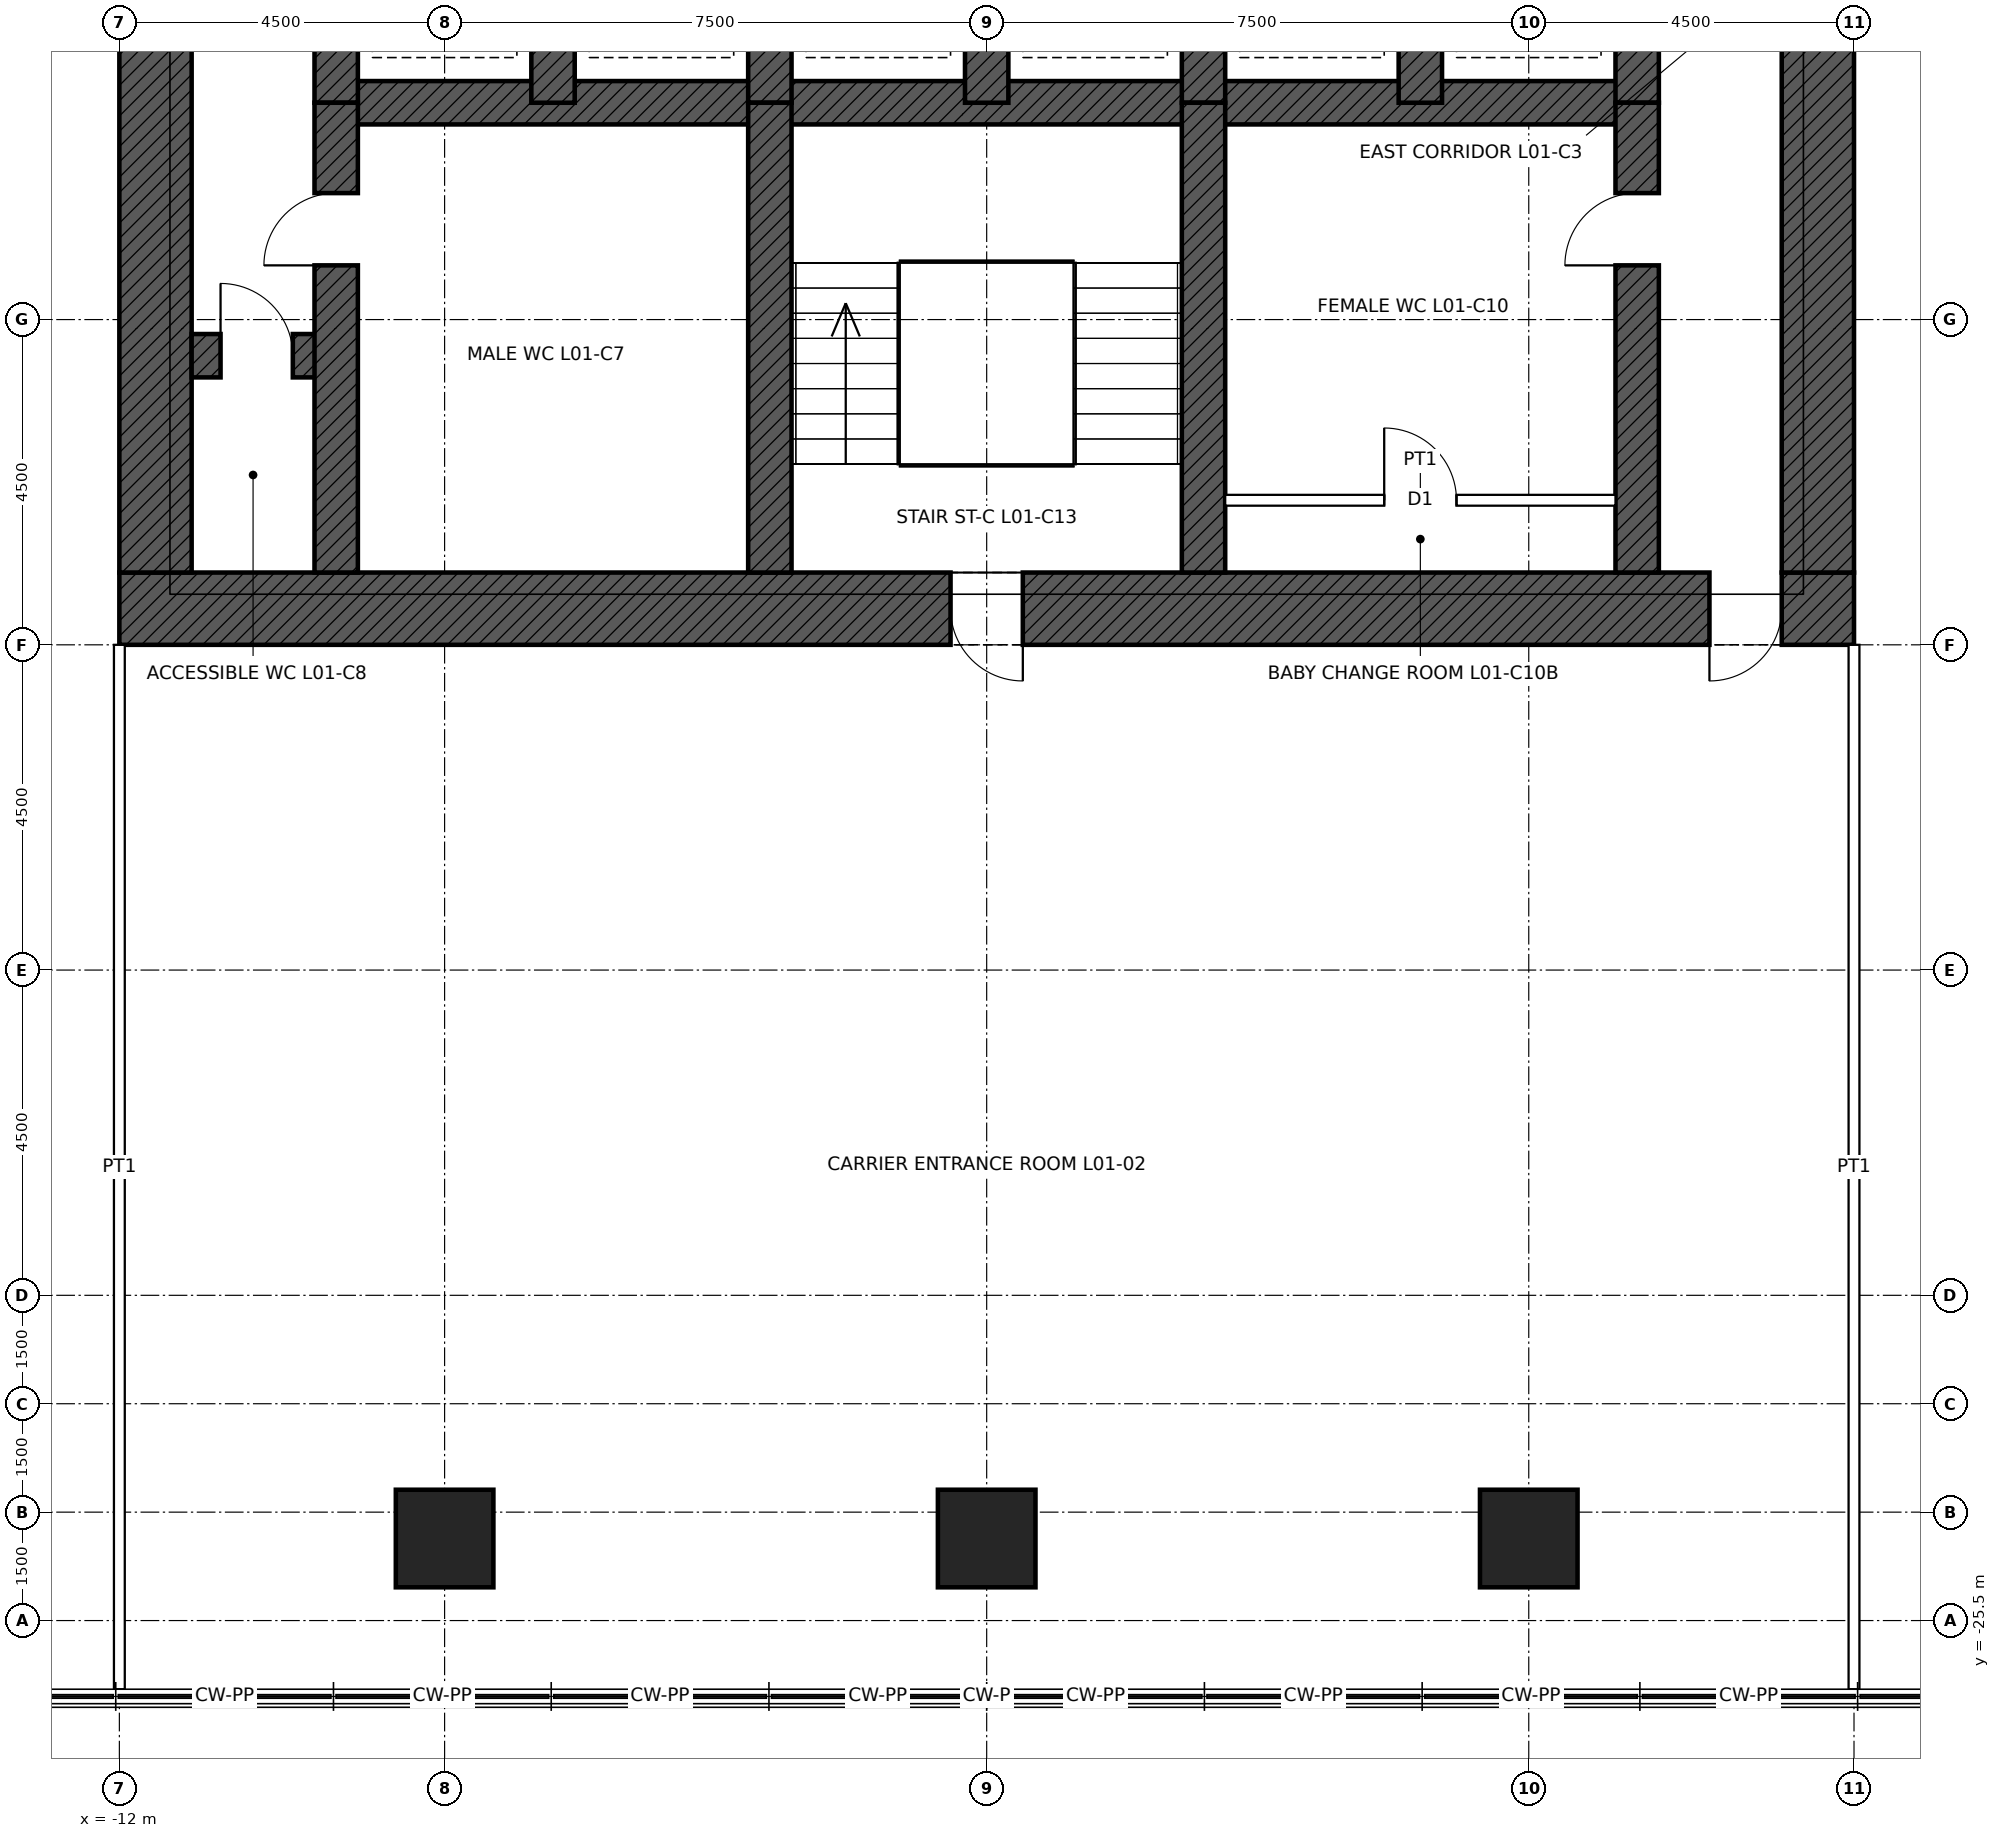
"""IFC4 building model, lengths in metres.
Left out: names, types, materials, properties, quantities, classifications, styles, units other than length and angle.
Written with IfcOpenShell. Run it as: python <this file> out.ifc"""

import sys

from ifc_helpers import new_model, si_unit, direction, frame, frame_2d, origin, origin_2d, place, context, subcontext, project, spatial, rectangle, hollow_rectangle, extrude, element, fill, save


model = new_model("IFC4")
c1 = context("Model", 3, precision=1e-05, world=origin(), true_north=direction((0.0, 1.0)))
c2 = subcontext(c1, "Body", "Model", "MODEL_VIEW")
j1 = project(units=[si_unit("LENGTHUNIT", "METRE"), si_unit("PLANEANGLEUNIT", "RADIAN")], contexts=[c1])
p1 = place(None, origin())
s1 = spatial("IfcSite", under=j1, at=p1, CompositionType="ELEMENT")
p2 = place(p1, origin())
s2 = spatial("IfcBuilding", under=s1, at=p2, CompositionType="ELEMENT")
p3 = place(p2, frame((0.0, 0.0, 7.2)))
s3 = spatial("IfcBuildingStorey", under=s2, at=p3, CompositionType="ELEMENT", Elevation=7.2)
for number, where, z_axis, x_axis in (
    (1, (7.5, -24.365, 0.0), (0.0, 0.0, 1.0), (1.0, 0.0, 0.0)),
    (2, (0.0, -24.365, 0.0), (0.0, 0.0, 1.0), (1.0, 0.0, 0.0)),
    (3, (-7.5, -24.365, 0.0), (0.0, 0.0, 1.0), (1.0, 0.0, 0.0)),
):
    element("IfcColumn", number, at=place(p3, frame(where, z_axis=z_axis, x_axis=x_axis)), inside=s3, PredefinedType="COLUMN", context=c2, shape_type="SweptSolid", body=[
        extrude(hollow_rectangle(XDim=1.35, YDim=1.35, WallThickness=0.1, at=origin_2d()), origin(), (0.0, 0.0, 1.0), 5.4),
    ])
p4 = place(p3, frame((12.0, -11.5, 0.0), z_axis=(0.0, 0.0, 1.0), x_axis=(-1.0, 0.0, 0.0)))
e4 = element("IfcWall", 4, at=p4, inside=s3, PredefinedType="SHEAR", context=c2, shape_type="SweptSolid", body=[
    extrude(rectangle(XDim=24.0, YDim=1.0, at=frame_2d((12.0, 0.0))), origin(), (0.0, 0.0, 1.0), 5.4),
])
p5 = place(p4, frame((11.5, 0.0, 0.0)))
e5 = element("IfcOpeningElement", 5, at=p5, cuts=e4, PredefinedType="OPENING", context=c2, shape_type="SweptSolid", body=[
    extrude(rectangle(XDim=1.0, YDim=2.1, at=frame_2d((0.5, 1.05))), frame((0.0, 0.51, 0.0), z_axis=(0.0, -1.0, 0.0), x_axis=(1.0, 0.0, 0.0)), (0.0, 0.0, 1.0), 1.02),
])
p6 = place(p4, frame((1.0, 0.0, 0.0)))
e6 = element("IfcOpeningElement", 6, at=p6, cuts=e4, PredefinedType="OPENING", context=c2, shape_type="SweptSolid", body=[
    extrude(rectangle(XDim=1.0, YDim=2.4, at=frame_2d((0.5, 1.2))), frame((0.0, 0.51, 0.0), z_axis=(0.0, -1.0, 0.0), x_axis=(1.0, 0.0, 0.0)), (0.0, 0.0, 1.0), 1.02),
])
p7 = place(p3, frame((11.5, 11.0, 0.0), z_axis=(0.0, 0.0, 1.0), x_axis=(0.0, -1.0, 0.0)))
e7 = element("IfcWall", 7, at=p7, inside=s3, PredefinedType="SHEAR", context=c2, shape_type="SweptSolid", body=[
    extrude(rectangle(XDim=22.0, YDim=1.0, at=frame_2d((11.0, 0.0))), origin(), (0.0, 0.0, 1.0), 5.4),
])
p8 = place(p7, frame((10.5, 0.0, 0.0)))
e8 = element("IfcOpeningElement", 8, at=p8, cuts=e7, PredefinedType="OPENING", context=c2, shape_type="SweptSolid", body=[
    extrude(rectangle(XDim=1.0, YDim=2.4, at=frame_2d((0.5, 1.2))), frame((0.0, 0.51, 0.0), z_axis=(0.0, -1.0, 0.0), x_axis=(1.0, 0.0, 0.0)), (0.0, 0.0, 1.0), 1.02),
])
p9 = place(p3, frame((-11.5, -11.0, 0.0), z_axis=(0.0, 0.0, 1.0), x_axis=(0.0, 1.0, 0.0)))
e9 = element("IfcWall", 9, at=p9, inside=s3, PredefinedType="SHEAR", context=c2, shape_type="SweptSolid", body=[
    extrude(rectangle(XDim=22.0, YDim=1.0, at=frame_2d((11.0, 0.0))), origin(), (0.0, 0.0, 1.0), 5.4),
])
p10 = place(p9, frame((10.5, 0.0, 0.0)))
e10 = element("IfcOpeningElement", 10, at=p10, cuts=e9, PredefinedType="OPENING", context=c2, shape_type="SweptSolid", body=[
    extrude(rectangle(XDim=1.0, YDim=2.4, at=frame_2d((0.5, 1.2))), frame((0.0, 0.51, 0.0), z_axis=(0.0, -1.0, 0.0), x_axis=(1.0, 0.0, 0.0)), (0.0, 0.0, 1.0), 1.02),
])
p11 = place(p3, frame((-9.0, -4.5, 0.0), z_axis=(0.0, 0.0, 1.0), x_axis=(1.0, 0.0, 0.0)))
e11 = element("IfcWall", 11, at=p11, inside=s3, PredefinedType="SHEAR", context=c2, shape_type="SweptSolid", body=[
    extrude(rectangle(XDim=18.0, YDim=0.6, at=frame_2d((9.0, 0.0))), origin(), (0.0, 0.0, 1.0), 5.4),
])
p12 = place(p3, frame((-11.0, -8.0, 0.0), z_axis=(0.0, 0.0, 1.0), x_axis=(1.0, 0.0, 0.0)))
e12 = element("IfcWall", 12, at=p12, inside=s3, PredefinedType="SHEAR", context=c2, shape_type="SweptSolid", body=[
    extrude(rectangle(XDim=2.0, YDim=0.6, at=frame_2d((1.0, 0.0))), origin(), (0.0, 0.0, 1.0), 5.4),
])
p13 = place(p12, frame((0.4, 0.0, 0.0)))
e13 = element("IfcOpeningElement", 13, at=p13, cuts=e12, PredefinedType="OPENING", context=c2, shape_type="SweptSolid", body=[
    extrude(rectangle(XDim=1.0, YDim=2.1, at=frame_2d((0.5, 1.05))), frame((0.0, 0.31, 0.0), z_axis=(0.0, -1.0, 0.0), x_axis=(1.0, 0.0, 0.0)), (0.0, 0.0, 1.0), 0.62),
])
for number, where, z_axis, x_axis in (
    (14, (-9.0, -4.5, 0.0), (0.0, 0.0, 1.0), (0.0, 1.0, 0.0)),
    (15, (9.0, -4.5, 0.0), (0.0, 0.0, 1.0), (0.0, 1.0, 0.0)),
    (16, (-6.0, -4.5, 0.0), (0.0, 0.0, 1.0), (0.0, 1.0, 0.0)),
    (17, (-3.0, -4.5, 0.0), (0.0, 0.0, 1.0), (0.0, 1.0, 0.0)),
    (18, (0.0, -4.5, 0.0), (0.0, 0.0, 1.0), (0.0, 1.0, 0.0)),
    (19, (3.0, -4.5, 0.0), (0.0, 0.0, 1.0), (0.0, 1.0, 0.0)),
    (20, (6.0, -4.5, 0.0), (0.0, 0.0, 1.0), (0.0, 1.0, 0.0)),
):
    element("IfcWall", number, at=place(p3, frame(where, z_axis=z_axis, x_axis=x_axis)), inside=s3, PredefinedType="SHEAR", context=c2, shape_type="SweptSolid", body=[
        extrude(rectangle(XDim=3.0, YDim=0.6, at=frame_2d((1.5, 0.0))), origin(), (0.0, 0.0, 1.0), 5.4),
    ])
p14 = place(p3, frame((-9.0, -11.0, 0.0), z_axis=(0.0, 0.0, 1.0), x_axis=(0.0, 1.0, 0.0)))
e21 = element("IfcWall", 21, at=p14, inside=s3, PredefinedType="SHEAR", context=c2, shape_type="SweptSolid", body=[
    extrude(rectangle(XDim=6.5, YDim=0.6, at=frame_2d((3.25, 0.0))), origin(), (0.0, 0.0, 1.0), 5.4),
])
p15 = place(p14, frame((4.25, 0.0, 0.0)))
e22 = element("IfcOpeningElement", 22, at=p15, cuts=e21, PredefinedType="OPENING", context=c2, shape_type="SweptSolid", body=[
    extrude(rectangle(XDim=1.0, YDim=2.1, at=frame_2d((0.5, 1.05))), frame((0.0, 0.31, 0.0), z_axis=(0.0, -1.0, 0.0), x_axis=(1.0, 0.0, 0.0)), (0.0, 0.0, 1.0), 0.62),
])
p16 = place(p3, frame((9.0, -11.0, 0.0), z_axis=(0.0, 0.0, 1.0), x_axis=(0.0, 1.0, 0.0)))
e23 = element("IfcWall", 23, at=p16, inside=s3, PredefinedType="SHEAR", context=c2, shape_type="SweptSolid", body=[
    extrude(rectangle(XDim=6.5, YDim=0.6, at=frame_2d((3.25, 0.0))), origin(), (0.0, 0.0, 1.0), 5.4),
])
p17 = place(p16, frame((4.25, 0.0, 0.0)))
e24 = element("IfcOpeningElement", 24, at=p17, cuts=e23, PredefinedType="OPENING", context=c2, shape_type="SweptSolid", body=[
    extrude(rectangle(XDim=1.0, YDim=2.1, at=frame_2d((0.5, 1.05))), frame((0.0, 0.31, 0.0), z_axis=(0.0, -1.0, 0.0), x_axis=(1.0, 0.0, 0.0)), (0.0, 0.0, 1.0), 0.62),
])
for number, where, z_axis, x_axis in (
    (25, (-3.0, -11.0, 0.0), (0.0, 0.0, 1.0), (0.0, 1.0, 0.0)),
    (26, (3.0, -11.0, 0.0), (0.0, 0.0, 1.0), (0.0, 1.0, 0.0)),
):
    element("IfcWall", number, at=place(p3, frame(where, z_axis=z_axis, x_axis=x_axis)), inside=s3, PredefinedType="SHEAR", context=c2, shape_type="SweptSolid", body=[
        extrude(rectangle(XDim=6.5, YDim=0.6, at=frame_2d((3.25, 0.0))), origin(), (0.0, 0.0, 1.0), 5.4),
    ])
p18 = place(p3, frame((-12.0, -12.0, 0.0), z_axis=(0.0, 0.0, 1.0), x_axis=(0.0, -1.0, 0.0)))
e27 = element("IfcWall", 27, at=p18, inside=s3, PredefinedType="PARTITIONING", context=c2, shape_type="SweptSolid", body=[
    extrude(rectangle(XDim=14.45, YDim=0.15, at=frame_2d((7.225, 0.0))), origin(), (0.0, 0.0, 1.0), 5.15),
])
p19 = place(p3, frame((12.0, -12.0, 0.0), z_axis=(0.0, 0.0, 1.0), x_axis=(0.0, -1.0, 0.0)))
e28 = element("IfcWall", 28, at=p19, inside=s3, PredefinedType="PARTITIONING", context=c2, shape_type="SweptSolid", body=[
    extrude(rectangle(XDim=14.45, YDim=0.15, at=frame_2d((7.225, 0.0))), origin(), (0.0, 0.0, 1.0), 4.109),
])
p20 = place(p3, frame((3.3, -10.0, 0.0), z_axis=(0.0, 0.0, 1.0), x_axis=(1.0, 0.0, 0.0)))
e29 = element("IfcWall", 29, at=p20, inside=s3, PredefinedType="PARTITIONING", context=c2, shape_type="SweptSolid", body=[
    extrude(rectangle(XDim=5.4, YDim=0.15, at=frame_2d((2.7, 0.0))), origin(), (0.0, 0.0, 1.0), 5.15),
])
p21 = place(p20, frame((2.2, 0.0, 0.0)))
e30 = element("IfcOpeningElement", 30, at=p21, cuts=e29, PredefinedType="OPENING", context=c2, shape_type="SweptSolid", body=[
    extrude(rectangle(XDim=1.0, YDim=2.1, at=frame_2d((0.5, 1.05))), frame((0.0, 0.085, 0.0), z_axis=(0.0, -1.0, 0.0), x_axis=(1.0, 0.0, 0.0)), (0.0, 0.0, 1.0), 0.17),
])
p22 = place(p5, origin())
e31 = element("IfcDoor", 31, at=p22, inside=s3, OperationType="SINGLE_SWING_LEFT", PredefinedType="DOOR", context=c2, shape_type="SweptSolid", body=[
    extrude(rectangle(XDim=1.0, YDim=2.1, at=frame_2d((0.5, 1.05))), frame((0.0, 0.485, 0.0), z_axis=(0.0, -1.0, 0.0), x_axis=(1.0, 0.0, 0.0)), (0.0, 0.0, 1.0), 0.05),
])
fill(e5, e31)
p23 = place(p6, origin())
e32 = element("IfcDoor", 32, at=p23, inside=s3, OperationType="SINGLE_SWING_RIGHT", PredefinedType="DOOR", context=c2, shape_type="SweptSolid", body=[
    extrude(rectangle(XDim=1.0, YDim=2.4, at=frame_2d((0.5, 1.2))), frame((0.0, 0.485, 0.0), z_axis=(0.0, -1.0, 0.0), x_axis=(1.0, 0.0, 0.0)), (0.0, 0.0, 1.0), 0.05),
])
fill(e6, e32)
p24 = place(p15, origin())
e33 = element("IfcDoor", 33, at=p24, inside=s3, OperationType="SINGLE_SWING_LEFT", PredefinedType="DOOR", context=c2, shape_type="SweptSolid", body=[
    extrude(rectangle(XDim=1.0, YDim=2.1, at=frame_2d((0.5, 1.05))), frame((0.0, 0.025, 0.0), z_axis=(0.0, -1.0, 0.0), x_axis=(1.0, 0.0, 0.0)), (0.0, 0.0, 1.0), 0.05),
])
fill(e22, e33)
p25 = place(p17, origin())
e34 = element("IfcDoor", 34, at=p25, inside=s3, OperationType="SINGLE_SWING_LEFT", PredefinedType="DOOR", context=c2, shape_type="SweptSolid", body=[
    extrude(rectangle(XDim=1.0, YDim=2.1, at=frame_2d((0.5, 1.05))), frame((0.0, 0.025, 0.0), z_axis=(0.0, -1.0, 0.0), x_axis=(1.0, 0.0, 0.0)), (0.0, 0.0, 1.0), 0.05),
])
fill(e24, e34)
p26 = place(p13, origin())
e35 = element("IfcDoor", 35, at=p26, inside=s3, OperationType="SINGLE_SWING_LEFT", PredefinedType="DOOR", context=c2, shape_type="SweptSolid", body=[
    extrude(rectangle(XDim=1.0, YDim=2.1, at=frame_2d((0.5, 1.05))), frame((0.0, 0.025, 0.0), z_axis=(0.0, -1.0, 0.0), x_axis=(1.0, 0.0, 0.0)), (0.0, 0.0, 1.0), 0.05),
])
fill(e13, e35)
p27 = place(p21, origin())
e36 = element("IfcDoor", 36, at=p27, inside=s3, OperationType="SINGLE_SWING_LEFT", PredefinedType="DOOR", context=c2, shape_type="SweptSolid", body=[
    extrude(rectangle(XDim=1.0, YDim=2.1, at=frame_2d((0.5, 1.05))), frame((0.0, 0.025, 0.0), z_axis=(0.0, -1.0, 0.0), x_axis=(1.0, 0.0, 0.0)), (0.0, 0.0, 1.0), 0.05),
])
fill(e30, e36)
save(model, sys.argv[1])
